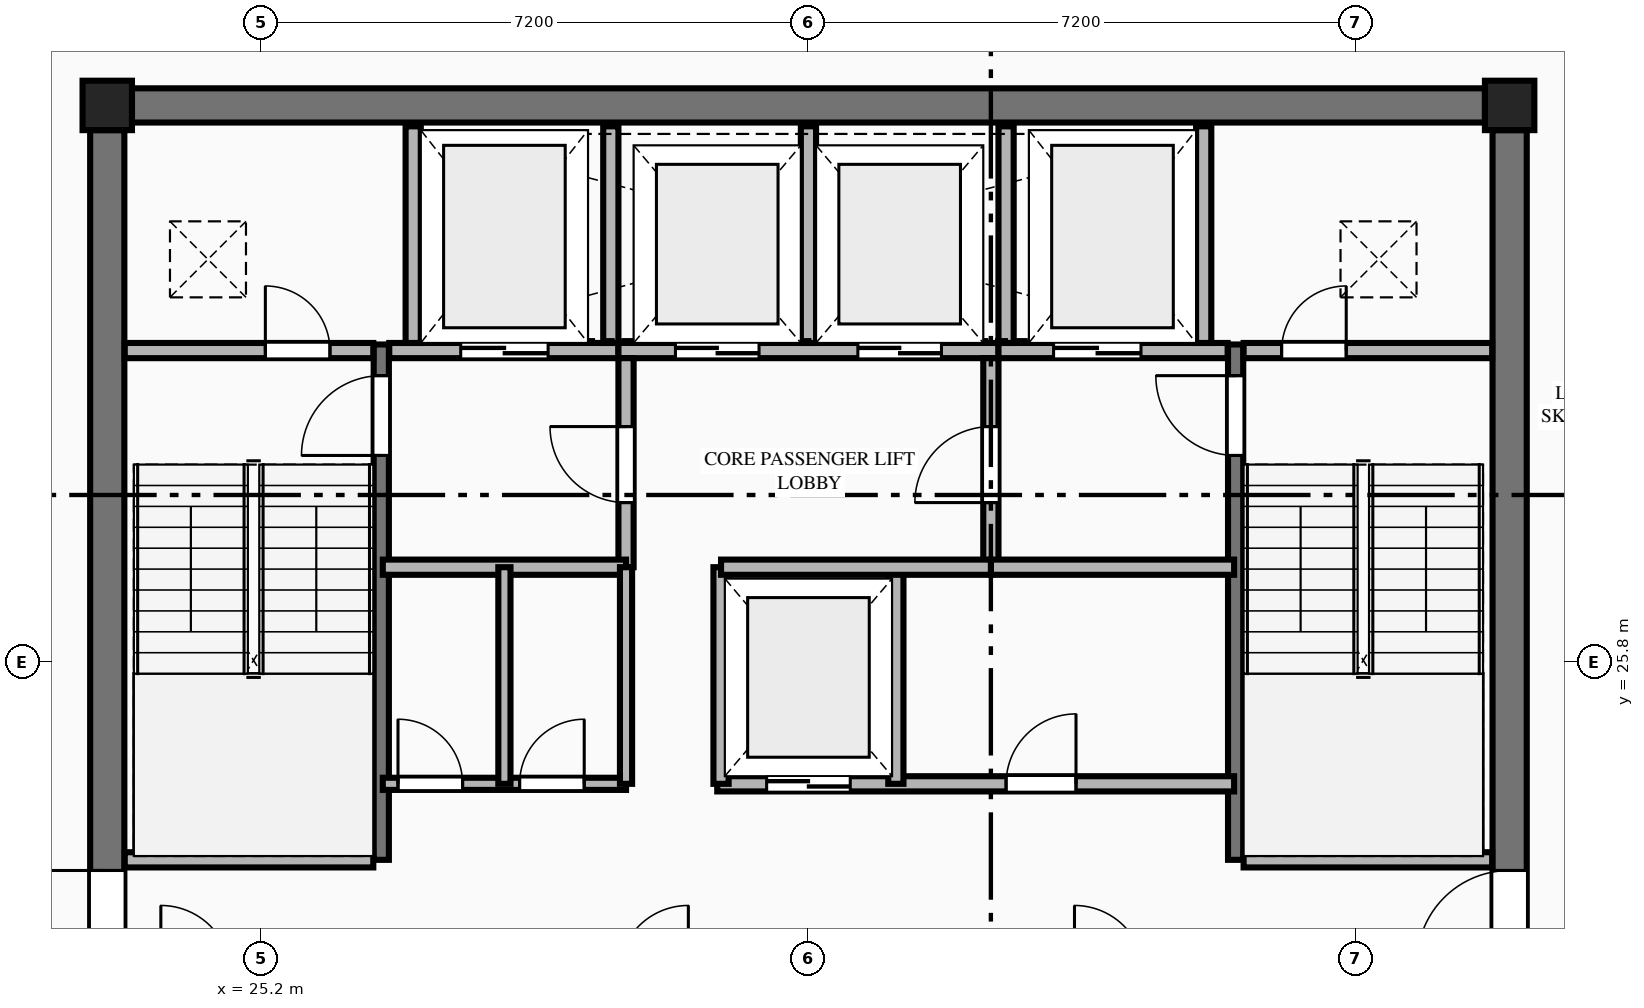
"""IFC4 building model, lengths in metres.
Left out: names, types, materials, properties, quantities, classifications, styles, units other than length and angle.
Written with IfcOpenShell. Run it as: python <this file> out.ifc"""

import sys

from ifc_helpers import new_model, si_unit, direction, frame, frame_2d, origin, origin_2d, place, context, subcontext, project, spatial, rectangle, extrude, element, fill, save


model = new_model("IFC4")
c1 = context("Model", 3, precision=1e-05, world=origin(), true_north=direction((0.0, 1.0)))
c2 = subcontext(c1, "Body", "Model", "MODEL_VIEW")
j1 = project(units=[si_unit("LENGTHUNIT", "METRE"), si_unit("PLANEANGLEUNIT", "RADIAN")], contexts=[c1])
p1 = place(None, origin())
s1 = spatial("IfcSite", under=j1, at=p1, CompositionType="ELEMENT")
p2 = place(p1, origin())
s2 = spatial("IfcBuilding", under=s1, at=p2, CompositionType="ELEMENT")
p3 = place(p2, frame((0.0, 0.0, 263.5)))
s3 = spatial("IfcBuildingStorey", under=s2, at=p3, CompositionType="ELEMENT", Elevation=263.5)
for number, where, z_axis, x_axis in (
    (1, (41.625, 33.125, 0.0), (0.0, 0.0, 1.0), (1.0, 0.0, 0.0)),
    (2, (23.175, 33.125, 0.0), (0.0, 0.0, 1.0), (1.0, 0.0, 0.0)),
):
    element("IfcColumn", number, at=place(p3, frame(where, z_axis=z_axis, x_axis=x_axis)), inside=s3, PredefinedType="COLUMN", context=c2, shape_type="SweptSolid", body=[
        extrude(rectangle(XDim=0.65, YDim=0.65, at=origin_2d()), origin(), (0.0, 0.0, 1.0), 3.65),
    ])
p4 = place(p3, frame((23.5, 33.125, 0.0), z_axis=(0.0, 0.0, 1.0), x_axis=(1.0, 0.0, 0.0)))
e3 = element("IfcWall", 3, at=p4, inside=s3, PredefinedType="SHEAR", context=c2, shape_type="SweptSolid", body=[
    extrude(rectangle(XDim=17.8, YDim=0.45, at=frame_2d((8.9, 0.0))), origin(), (0.0, 0.0, 1.0), 3.45),
])
p5 = place(p3, frame((23.175, 19.0, 0.0), z_axis=(0.0, 0.0, 1.0), x_axis=(0.0, 1.0, 0.0)))
e4 = element("IfcWall", 4, at=p5, inside=s3, PredefinedType="SHEAR", context=c2, shape_type="SweptSolid", body=[
    extrude(rectangle(XDim=13.8, YDim=0.45, at=frame_2d((6.9, 0.0))), origin(), (0.0, 0.0, 1.0), 3.45),
])
p6 = place(p5, frame((2.84, 0.0, 0.0)))
e5 = element("IfcOpeningElement", 5, at=p6, cuts=e4, PredefinedType="OPENING", context=c2, shape_type="SweptSolid", body=[
    extrude(rectangle(XDim=1.22, YDim=2.25, at=frame_2d((0.61, 1.125))), frame((0.0, 0.235, 0.0), z_axis=(0.0, -1.0, 0.0), x_axis=(1.0, 0.0, 0.0)), (0.0, 0.0, 1.0), 0.47),
])
p7 = place(p3, frame((41.625, 19.0, 0.0), z_axis=(0.0, 0.0, 1.0), x_axis=(0.0, 1.0, 0.0)))
e6 = element("IfcWall", 6, at=p7, inside=s3, PredefinedType="SHEAR", context=c2, shape_type="SweptSolid", body=[
    extrude(rectangle(XDim=13.8, YDim=0.45, at=frame_2d((6.9, 0.0))), origin(), (0.0, 0.0, 1.0), 3.45),
])
p8 = place(p7, frame((2.84, 0.0, 0.0)))
e7 = element("IfcOpeningElement", 7, at=p8, cuts=e6, PredefinedType="OPENING", context=c2, shape_type="SweptSolid", body=[
    extrude(rectangle(XDim=1.22, YDim=2.25, at=frame_2d((0.61, 1.125))), frame((0.0, 0.235, 0.0), z_axis=(0.0, -1.0, 0.0), x_axis=(1.0, 0.0, 0.0)), (0.0, 0.0, 1.0), 0.47),
])
p9 = place(p3, frame((26.78, 23.2, 0.0), z_axis=(0.0, 0.0, 1.0), x_axis=(0.0, 1.0, 0.0)))
e8 = element("IfcWall", 8, at=p9, inside=s3, PredefinedType="SHEAR", context=c2, shape_type="SweptSolid", body=[
    extrude(rectangle(XDim=6.78, YDim=0.2, at=frame_2d((3.39, 0.0))), origin(), (0.0, 0.0, 1.0), 3.65),
])
p10 = place(p9, frame((5.32, 0.0, 0.0)))
e9 = element("IfcOpeningElement", 9, at=p10, cuts=e8, PredefinedType="OPENING", context=c2, shape_type="SweptSolid", body=[
    extrude(rectangle(XDim=1.05, YDim=2.15, at=frame_2d((0.525, 1.075))), frame((0.0, 0.11, 0.0), z_axis=(0.0, -1.0, 0.0), x_axis=(1.0, 0.0, 0.0)), (0.0, 0.0, 1.0), 0.22),
])
p11 = place(p3, frame((23.405, 23.2, 0.0), z_axis=(0.0, 0.0, 1.0), x_axis=(1.0, 0.0, 0.0)))
e10 = element("IfcWall", 10, at=p11, inside=s3, PredefinedType="PLUMBINGWALL", context=c2, shape_type="SweptSolid", body=[
    extrude(rectangle(XDim=3.27, YDim=0.2, at=frame_2d((1.635, 0.0))), origin(), (0.0, 0.0, 1.0), 3.45),
])
p12 = place(p3, frame((38.02, 23.2, 0.0), z_axis=(0.0, 0.0, 1.0), x_axis=(0.0, 1.0, 0.0)))
e11 = element("IfcWall", 11, at=p12, inside=s3, PredefinedType="SHEAR", context=c2, shape_type="SweptSolid", body=[
    extrude(rectangle(XDim=6.78, YDim=0.2, at=frame_2d((3.39, 0.0))), origin(), (0.0, 0.0, 1.0), 3.65),
])
p13 = place(p12, frame((5.32, 0.0, 0.0)))
e12 = element("IfcOpeningElement", 12, at=p13, cuts=e11, PredefinedType="OPENING", context=c2, shape_type="SweptSolid", body=[
    extrude(rectangle(XDim=1.05, YDim=2.15, at=frame_2d((0.525, 1.075))), frame((0.0, 0.11, 0.0), z_axis=(0.0, -1.0, 0.0), x_axis=(1.0, 0.0, 0.0)), (0.0, 0.0, 1.0), 0.22),
])
p14 = place(p3, frame((38.125, 23.2, 0.0), z_axis=(0.0, 0.0, 1.0), x_axis=(1.0, 0.0, 0.0)))
e13 = element("IfcWall", 13, at=p14, inside=s3, PredefinedType="PLUMBINGWALL", context=c2, shape_type="SweptSolid", body=[
    extrude(rectangle(XDim=3.27, YDim=0.2, at=frame_2d((1.635, 0.0))), origin(), (0.0, 0.0, 1.0), 3.45),
])
p15 = place(p3, frame((23.405, 29.9, 0.0), z_axis=(0.0, 0.0, 1.0), x_axis=(1.0, 0.0, 0.0)))
e14 = element("IfcWall", 14, at=p15, inside=s3, PredefinedType="PLUMBINGWALL", context=c2, shape_type="SweptSolid", body=[
    extrude(rectangle(XDim=3.27, YDim=0.2, at=frame_2d((1.635, 0.0))), origin(), (0.0, 0.0, 1.0), 3.45),
])
p16 = place(p15, frame((1.85, 0.0, 0.0)))
e15 = element("IfcOpeningElement", 15, at=p16, cuts=e14, PredefinedType="OPENING", context=c2, shape_type="SweptSolid", body=[
    extrude(rectangle(XDim=0.85, YDim=2.05, at=frame_2d((0.425, 1.025))), frame((0.0, 0.11, 0.0), z_axis=(0.0, -1.0, 0.0), x_axis=(1.0, 0.0, 0.0)), (0.0, 0.0, 1.0), 0.22),
])
p17 = place(p3, frame((26.885, 29.9, 0.0), z_axis=(0.0, 0.0, 1.0), x_axis=(1.0, 0.0, 0.0)))
e16 = element("IfcWall", 16, at=p17, inside=s3, PredefinedType="PLUMBINGWALL", context=c2, shape_type="SweptSolid", body=[
    extrude(rectangle(XDim=3.015, YDim=0.2, at=frame_2d((1.507, 0.0))), origin(), (0.0, 0.0, 1.0), 3.45),
])
p18 = place(p17, frame((0.94, 0.0, 0.0)))
e17 = element("IfcOpeningElement", 17, at=p18, cuts=e16, PredefinedType="OPENING", context=c2, shape_type="SweptSolid", body=[
    extrude(rectangle(XDim=1.15, YDim=2.2, at=frame_2d((0.575, 1.1))), frame((0.0, 0.11, 0.0), z_axis=(0.0, -1.0, 0.0), x_axis=(1.0, 0.0, 0.0)), (0.0, 0.0, 1.0), 0.22),
])
p19 = place(p3, frame((29.9, 29.9, 0.0), z_axis=(0.0, 0.0, 1.0), x_axis=(1.0, 0.0, 0.0)))
e18 = element("IfcWall", 18, at=p19, inside=s3, PredefinedType="PLUMBINGWALL", context=c2, shape_type="SweptSolid", body=[
    extrude(rectangle(XDim=5.0, YDim=0.2, at=frame_2d((2.5, 0.0))), origin(), (0.0, 0.0, 1.0), 3.45),
])
p20 = place(p19, frame((0.75, 0.0, 0.0)))
e19 = element("IfcOpeningElement", 19, at=p20, cuts=e18, PredefinedType="OPENING", context=c2, shape_type="SweptSolid", body=[
    extrude(rectangle(XDim=1.1, YDim=2.2, at=frame_2d((0.55, 1.1))), frame((0.0, 0.11, 0.0), z_axis=(0.0, -1.0, 0.0), x_axis=(1.0, 0.0, 0.0)), (0.0, 0.0, 1.0), 0.22),
])
p21 = place(p19, frame((3.15, 0.0, 0.0)))
e20 = element("IfcOpeningElement", 20, at=p21, cuts=e18, PredefinedType="OPENING", context=c2, shape_type="SweptSolid", body=[
    extrude(rectangle(XDim=1.1, YDim=2.2, at=frame_2d((0.55, 1.1))), frame((0.0, 0.11, 0.0), z_axis=(0.0, -1.0, 0.0), x_axis=(1.0, 0.0, 0.0)), (0.0, 0.0, 1.0), 0.22),
])
p22 = place(p3, frame((34.9, 29.9, 0.0), z_axis=(0.0, 0.0, 1.0), x_axis=(1.0, 0.0, 0.0)))
e21 = element("IfcWall", 21, at=p22, inside=s3, PredefinedType="PLUMBINGWALL", context=c2, shape_type="SweptSolid", body=[
    extrude(rectangle(XDim=3.015, YDim=0.2, at=frame_2d((1.508, 0.0))), origin(), (0.0, 0.0, 1.0), 3.45),
])
p23 = place(p22, frame((0.725, 0.0, 0.0)))
e22 = element("IfcOpeningElement", 22, at=p23, cuts=e21, PredefinedType="OPENING", context=c2, shape_type="SweptSolid", body=[
    extrude(rectangle(XDim=1.15, YDim=2.2, at=frame_2d((0.575, 1.1))), frame((0.0, 0.11, 0.0), z_axis=(0.0, -1.0, 0.0), x_axis=(1.0, 0.0, 0.0)), (0.0, 0.0, 1.0), 0.22),
])
p24 = place(p3, frame((38.125, 29.9, 0.0), z_axis=(0.0, 0.0, 1.0), x_axis=(1.0, 0.0, 0.0)))
e23 = element("IfcWall", 23, at=p24, inside=s3, PredefinedType="PLUMBINGWALL", context=c2, shape_type="SweptSolid", body=[
    extrude(rectangle(XDim=3.27, YDim=0.2, at=frame_2d((1.635, 0.0))), origin(), (0.0, 0.0, 1.0), 3.45),
])
p25 = place(p24, frame((0.5, 0.0, 0.0)))
e24 = element("IfcOpeningElement", 24, at=p25, cuts=e23, PredefinedType="OPENING", context=c2, shape_type="SweptSolid", body=[
    extrude(rectangle(XDim=0.85, YDim=2.05, at=frame_2d((0.425, 1.025))), frame((0.0, 0.11, 0.0), z_axis=(0.0, -1.0, 0.0), x_axis=(1.0, 0.0, 0.0)), (0.0, 0.0, 1.0), 0.22),
])
for number, where, z_axis, x_axis in (
    (25, (27.2, 30.0, 0.0), (0.0, 0.0, 1.0), (0.0, 1.0, 0.0)),
    (26, (29.8, 30.0, 0.0), (0.0, 0.0, 1.0), (0.0, 1.0, 0.0)),
    (27, (32.4, 30.0, 0.0), (0.0, 0.0, 1.0), (0.0, 1.0, 0.0)),
    (28, (35.0, 30.0, 0.0), (0.0, 0.0, 1.0), (0.0, 1.0, 0.0)),
    (29, (37.6, 30.0, 0.0), (0.0, 0.0, 1.0), (0.0, 1.0, 0.0)),
):
    element("IfcWall", number, at=place(p3, frame(where, z_axis=z_axis, x_axis=x_axis)), inside=s3, PredefinedType="PLUMBINGWALL", context=c2, shape_type="SweptSolid", body=[
        extrude(rectangle(XDim=2.85, YDim=0.2, at=frame_2d((1.425, 0.0))), origin(), (0.0, 0.0, 1.0), 3.45),
    ])
p26 = place(p3, frame((30.0, 27.05, 0.0), z_axis=(0.0, 0.0, 1.0), x_axis=(0.0, 1.0, 0.0)))
e30 = element("IfcWall", 30, at=p26, inside=s3, PredefinedType="PLUMBINGWALL", context=c2, shape_type="SweptSolid", body=[
    extrude(rectangle(XDim=2.75, YDim=0.2, at=frame_2d((1.375, 0.0))), origin(), (0.0, 0.0, 1.0), 3.45),
])
p27 = place(p26, frame((0.85, 0.0, 0.0)))
e31 = element("IfcOpeningElement", 31, at=p27, cuts=e30, PredefinedType="OPENING", context=c2, shape_type="SweptSolid", body=[
    extrude(rectangle(XDim=1.0, YDim=2.15, at=frame_2d((0.5, 1.075))), frame((0.0, 0.11, 0.0), z_axis=(0.0, -1.0, 0.0), x_axis=(1.0, 0.0, 0.0)), (0.0, 0.0, 1.0), 0.22),
])
p28 = place(p3, frame((26.8, 27.05, 0.0), z_axis=(0.0, 0.0, 1.0), x_axis=(1.0, 0.0, 0.0)))
e32 = element("IfcWall", 32, at=p28, inside=s3, PredefinedType="PLUMBINGWALL", context=c2, shape_type="SweptSolid", body=[
    extrude(rectangle(XDim=3.2, YDim=0.2, at=frame_2d((1.6, 0.0))), origin(), (0.0, 0.0, 1.0), 3.45),
])
p29 = place(p3, frame((34.8, 27.05, 0.0), z_axis=(0.0, 0.0, 1.0), x_axis=(0.0, 1.0, 0.0)))
e33 = element("IfcWall", 33, at=p29, inside=s3, PredefinedType="PLUMBINGWALL", context=c2, shape_type="SweptSolid", body=[
    extrude(rectangle(XDim=2.75, YDim=0.2, at=frame_2d((1.375, 0.0))), origin(), (0.0, 0.0, 1.0), 3.45),
])
p30 = place(p29, frame((0.85, 0.0, 0.0)))
e34 = element("IfcOpeningElement", 34, at=p30, cuts=e33, PredefinedType="OPENING", context=c2, shape_type="SweptSolid", body=[
    extrude(rectangle(XDim=1.0, YDim=2.15, at=frame_2d((0.5, 1.075))), frame((0.0, 0.11, 0.0), z_axis=(0.0, -1.0, 0.0), x_axis=(1.0, 0.0, 0.0)), (0.0, 0.0, 1.0), 0.22),
])
p31 = place(p3, frame((34.8, 27.05, 0.0), z_axis=(0.0, 0.0, 1.0), x_axis=(1.0, 0.0, 0.0)))
e35 = element("IfcWall", 35, at=p31, inside=s3, PredefinedType="PLUMBINGWALL", context=c2, shape_type="SweptSolid", body=[
    extrude(rectangle(XDim=3.2, YDim=0.2, at=frame_2d((1.6, 0.0))), origin(), (0.0, 0.0, 1.0), 3.45),
])
p32 = place(p3, frame((26.8, 24.2, 0.0), z_axis=(0.0, 0.0, 1.0), x_axis=(1.0, 0.0, 0.0)))
e36 = element("IfcWall", 36, at=p32, inside=s3, PredefinedType="PARTITIONING", context=c2, shape_type="SweptSolid", body=[
    extrude(rectangle(XDim=3.2, YDim=0.16, at=frame_2d((1.6, 0.0))), origin(), (0.0, 0.0, 1.0), 3.45),
])
p33 = place(p32, frame((0.2, 0.0, 0.0)))
e37 = element("IfcOpeningElement", 37, at=p33, cuts=e36, PredefinedType="OPENING", context=c2, shape_type="SweptSolid", body=[
    extrude(rectangle(XDim=0.85, YDim=2.05, at=frame_2d((0.425, 1.025))), frame((0.0, 0.09, 0.0), z_axis=(0.0, -1.0, 0.0), x_axis=(1.0, 0.0, 0.0)), (0.0, 0.0, 1.0), 0.18),
])
p34 = place(p32, frame((1.8, 0.0, 0.0)))
e38 = element("IfcOpeningElement", 38, at=p34, cuts=e36, PredefinedType="OPENING", context=c2, shape_type="SweptSolid", body=[
    extrude(rectangle(XDim=0.85, YDim=2.05, at=frame_2d((0.425, 1.025))), frame((0.0, 0.09, 0.0), z_axis=(0.0, -1.0, 0.0), x_axis=(1.0, 0.0, 0.0)), (0.0, 0.0, 1.0), 0.18),
])
p35 = place(p3, frame((30.0, 24.2, 0.0), z_axis=(0.0, 0.0, 1.0), x_axis=(0.0, 1.0, 0.0)))
e39 = element("IfcWall", 39, at=p35, inside=s3, PredefinedType="PARTITIONING", context=c2, shape_type="SweptSolid", body=[
    extrude(rectangle(XDim=2.85, YDim=0.16, at=frame_2d((1.425, 0.0))), origin(), (0.0, 0.0, 1.0), 3.45),
])
p36 = place(p3, frame((31.2, 24.2, 0.0), z_axis=(0.0, 0.0, 1.0), x_axis=(1.0, 0.0, 0.0)))
e40 = element("IfcWall", 40, at=p36, inside=s3, PredefinedType="PLUMBINGWALL", context=c2, shape_type="SweptSolid", body=[
    extrude(rectangle(XDim=6.8, YDim=0.2, at=frame_2d((3.4, 0.0))), origin(), (0.0, 0.0, 1.0), 3.45),
])
p37 = place(p36, frame((0.65, 0.0, 0.0)))
e41 = element("IfcOpeningElement", 41, at=p37, cuts=e40, PredefinedType="OPENING", context=c2, shape_type="SweptSolid", body=[
    extrude(rectangle(XDim=1.1, YDim=2.2, at=frame_2d((0.55, 1.1))), frame((0.0, 0.11, 0.0), z_axis=(0.0, -1.0, 0.0), x_axis=(1.0, 0.0, 0.0)), (0.0, 0.0, 1.0), 0.22),
])
p38 = place(p36, frame((3.8, 0.0, 0.0)))
e42 = element("IfcOpeningElement", 42, at=p38, cuts=e40, PredefinedType="OPENING", context=c2, shape_type="SweptSolid", body=[
    extrude(rectangle(XDim=0.92, YDim=2.15, at=frame_2d((0.46, 1.075))), frame((0.0, 0.11, 0.0), z_axis=(0.0, -1.0, 0.0), x_axis=(1.0, 0.0, 0.0)), (0.0, 0.0, 1.0), 0.22),
])
for number, where, z_axis, x_axis in (
    (43, (31.25, 24.2, 0.0), (0.0, 0.0, 1.0), (0.0, 1.0, 0.0)),
    (44, (33.55, 24.2, 0.0), (0.0, 0.0, 1.0), (0.0, 1.0, 0.0)),
):
    element("IfcWall", number, at=place(p3, frame(where, z_axis=z_axis, x_axis=x_axis)), inside=s3, PredefinedType="PLUMBINGWALL", context=c2, shape_type="SweptSolid", body=[
        extrude(rectangle(XDim=2.85, YDim=0.2, at=frame_2d((1.425, 0.0))), origin(), (0.0, 0.0, 1.0), 3.45),
    ])
p39 = place(p3, frame((31.25, 27.05, 0.0), z_axis=(0.0, 0.0, 1.0), x_axis=(1.0, 0.0, 0.0)))
e45 = element("IfcWall", 45, at=p39, inside=s3, PredefinedType="PLUMBINGWALL", context=c2, shape_type="SweptSolid", body=[
    extrude(rectangle(XDim=3.55, YDim=0.2, at=frame_2d((1.775, 0.0))), origin(), (0.0, 0.0, 1.0), 3.45),
])
p40 = place(p3, frame((28.4, 24.2, 0.0), z_axis=(0.0, 0.0, 1.0), x_axis=(0.0, 1.0, 0.0)))
e46 = element("IfcWall", 46, at=p40, inside=s3, PredefinedType="PARTITIONING", context=c2, shape_type="SweptSolid", body=[
    extrude(rectangle(XDim=2.85, YDim=0.16, at=frame_2d((1.425, 0.0))), origin(), (0.0, 0.0, 1.0), 3.45),
])
p41 = place(p6, origin())
e47 = element("IfcDoor", 47, at=p41, inside=s3, OperationType="SINGLE_SWING_RIGHT", PredefinedType="DOOR", context=c2, shape_type="SweptSolid", body=[
    extrude(rectangle(XDim=1.22, YDim=2.25, at=frame_2d((0.61, 1.125))), frame((0.0, 0.025, 0.0), z_axis=(0.0, -1.0, 0.0), x_axis=(1.0, 0.0, 0.0)), (0.0, 0.0, 1.0), 0.05),
])
fill(e5, e47)
p42 = place(p8, origin())
e48 = element("IfcDoor", 48, at=p42, inside=s3, OperationType="SINGLE_SWING_LEFT", PredefinedType="DOOR", context=c2, shape_type="SweptSolid", body=[
    extrude(rectangle(XDim=1.22, YDim=2.25, at=frame_2d((0.61, 1.125))), frame((0.0, 0.025, 0.0), z_axis=(0.0, -1.0, 0.0), x_axis=(1.0, 0.0, 0.0)), (0.0, 0.0, 1.0), 0.05),
])
fill(e7, e48)
p43 = place(p10, origin())
e49 = element("IfcDoor", 49, at=p43, inside=s3, OperationType="SINGLE_SWING_LEFT", PredefinedType="DOOR", context=c2, shape_type="SweptSolid", body=[
    extrude(rectangle(XDim=1.05, YDim=2.15, at=frame_2d((0.525, 1.075))), frame((0.0, 0.025, 0.0), z_axis=(0.0, -1.0, 0.0), x_axis=(1.0, 0.0, 0.0)), (0.0, 0.0, 1.0), 0.05),
])
fill(e9, e49)
p44 = place(p13, origin())
e50 = element("IfcDoor", 50, at=p44, inside=s3, OperationType="SINGLE_SWING_RIGHT", PredefinedType="DOOR", context=c2, shape_type="SweptSolid", body=[
    extrude(rectangle(XDim=1.05, YDim=2.15, at=frame_2d((0.525, 1.075))), frame((0.0, 0.025, 0.0), z_axis=(0.0, -1.0, 0.0), x_axis=(1.0, 0.0, 0.0)), (0.0, 0.0, 1.0), 0.05),
])
fill(e12, e50)
p45 = place(p16, origin())
e51 = element("IfcDoor", 51, at=p45, inside=s3, OperationType="SINGLE_SWING_LEFT", PredefinedType="DOOR", context=c2, shape_type="SweptSolid", body=[
    extrude(rectangle(XDim=0.85, YDim=2.05, at=frame_2d((0.425, 1.025))), frame((0.0, 0.025, 0.0), z_axis=(0.0, -1.0, 0.0), x_axis=(1.0, 0.0, 0.0)), (0.0, 0.0, 1.0), 0.05),
])
fill(e15, e51)
p46 = place(p25, origin())
e52 = element("IfcDoor", 52, at=p46, inside=s3, OperationType="SINGLE_SWING_RIGHT", PredefinedType="DOOR", context=c2, shape_type="SweptSolid", body=[
    extrude(rectangle(XDim=0.85, YDim=2.05, at=frame_2d((0.425, 1.025))), frame((0.0, 0.025, 0.0), z_axis=(0.0, -1.0, 0.0), x_axis=(1.0, 0.0, 0.0)), (0.0, 0.0, 1.0), 0.05),
])
fill(e24, e52)
p47 = place(p18, origin())
e53 = element("IfcDoor", 53, at=p47, inside=s3, OperationType="DOUBLE_DOOR_SLIDING", PredefinedType="DOOR", context=c2, shape_type="SweptSolid", body=[
    extrude(rectangle(XDim=1.15, YDim=2.2, at=frame_2d((0.575, 1.1))), frame((0.0, 0.025, 0.0), z_axis=(0.0, -1.0, 0.0), x_axis=(1.0, 0.0, 0.0)), (0.0, 0.0, 1.0), 0.05),
])
fill(e17, e53)
p48 = place(p23, origin())
e54 = element("IfcDoor", 54, at=p48, inside=s3, OperationType="DOUBLE_DOOR_SLIDING", PredefinedType="DOOR", context=c2, shape_type="SweptSolid", body=[
    extrude(rectangle(XDim=1.15, YDim=2.2, at=frame_2d((0.575, 1.1))), frame((0.0, 0.025, 0.0), z_axis=(0.0, -1.0, 0.0), x_axis=(1.0, 0.0, 0.0)), (0.0, 0.0, 1.0), 0.05),
])
fill(e22, e54)
p49 = place(p20, origin())
e55 = element("IfcDoor", 55, at=p49, inside=s3, OperationType="DOUBLE_DOOR_SLIDING", PredefinedType="DOOR", context=c2, shape_type="SweptSolid", body=[
    extrude(rectangle(XDim=1.1, YDim=2.2, at=frame_2d((0.55, 1.1))), frame((0.0, 0.025, 0.0), z_axis=(0.0, -1.0, 0.0), x_axis=(1.0, 0.0, 0.0)), (0.0, 0.0, 1.0), 0.05),
])
fill(e19, e55)
p50 = place(p21, origin())
e56 = element("IfcDoor", 56, at=p50, inside=s3, OperationType="DOUBLE_DOOR_SLIDING", PredefinedType="DOOR", context=c2, shape_type="SweptSolid", body=[
    extrude(rectangle(XDim=1.1, YDim=2.2, at=frame_2d((0.55, 1.1))), frame((0.0, 0.025, 0.0), z_axis=(0.0, -1.0, 0.0), x_axis=(1.0, 0.0, 0.0)), (0.0, 0.0, 1.0), 0.05),
])
fill(e20, e56)
p51 = place(p27, origin())
e57 = element("IfcDoor", 57, at=p51, inside=s3, OperationType="SINGLE_SWING_RIGHT", PredefinedType="DOOR", context=c2, shape_type="SweptSolid", body=[
    extrude(rectangle(XDim=1.0, YDim=2.15, at=frame_2d((0.5, 1.075))), frame((0.0, 0.025, 0.0), z_axis=(0.0, -1.0, 0.0), x_axis=(1.0, 0.0, 0.0)), (0.0, 0.0, 1.0), 0.05),
])
fill(e31, e57)
p52 = place(p30, origin())
e58 = element("IfcDoor", 58, at=p52, inside=s3, OperationType="SINGLE_SWING_LEFT", PredefinedType="DOOR", context=c2, shape_type="SweptSolid", body=[
    extrude(rectangle(XDim=1.0, YDim=2.15, at=frame_2d((0.5, 1.075))), frame((0.0, 0.025, 0.0), z_axis=(0.0, -1.0, 0.0), x_axis=(1.0, 0.0, 0.0)), (0.0, 0.0, 1.0), 0.05),
])
fill(e34, e58)
p53 = place(p37, origin())
e59 = element("IfcDoor", 59, at=p53, inside=s3, OperationType="DOUBLE_DOOR_SLIDING", PredefinedType="DOOR", context=c2, shape_type="SweptSolid", body=[
    extrude(rectangle(XDim=1.1, YDim=2.2, at=frame_2d((0.55, 1.1))), frame((0.0, 0.025, 0.0), z_axis=(0.0, -1.0, 0.0), x_axis=(1.0, 0.0, 0.0)), (0.0, 0.0, 1.0), 0.05),
])
fill(e41, e59)
p54 = place(p33, origin())
e60 = element("IfcDoor", 60, at=p54, inside=s3, OperationType="SINGLE_SWING_LEFT", PredefinedType="DOOR", context=c2, shape_type="SweptSolid", body=[
    extrude(rectangle(XDim=0.85, YDim=2.05, at=frame_2d((0.425, 1.025))), frame((0.0, 0.025, 0.0), z_axis=(0.0, -1.0, 0.0), x_axis=(1.0, 0.0, 0.0)), (0.0, 0.0, 1.0), 0.05),
])
fill(e37, e60)
p55 = place(p34, origin())
e61 = element("IfcDoor", 61, at=p55, inside=s3, OperationType="SINGLE_SWING_RIGHT", PredefinedType="DOOR", context=c2, shape_type="SweptSolid", body=[
    extrude(rectangle(XDim=0.85, YDim=2.05, at=frame_2d((0.425, 1.025))), frame((0.0, 0.025, 0.0), z_axis=(0.0, -1.0, 0.0), x_axis=(1.0, 0.0, 0.0)), (0.0, 0.0, 1.0), 0.05),
])
fill(e38, e61)
p56 = place(p38, origin())
e62 = element("IfcDoor", 62, at=p56, inside=s3, OperationType="SINGLE_SWING_RIGHT", PredefinedType="DOOR", context=c2, shape_type="SweptSolid", body=[
    extrude(rectangle(XDim=0.92, YDim=2.15, at=frame_2d((0.46, 1.075))), frame((0.0, 0.025, 0.0), z_axis=(0.0, -1.0, 0.0), x_axis=(1.0, 0.0, 0.0)), (0.0, 0.0, 1.0), 0.05),
])
fill(e42, e62)
save(model, sys.argv[1])
